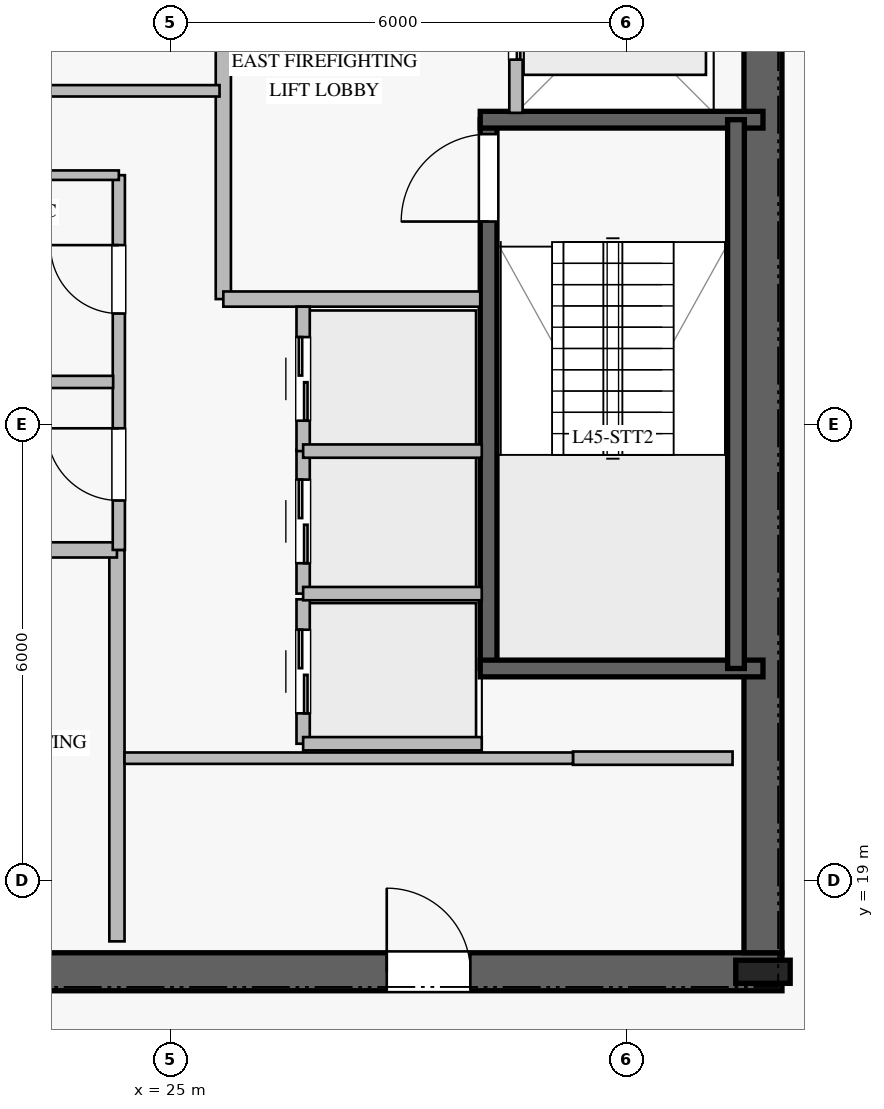
"""IFC4 building model, lengths in metres.
Left out: names, types, materials, properties, quantities, classifications, styles, units other than length and angle.
Written with IfcOpenShell. Run it as: python <this file> out.ifc"""

import sys

from ifc_helpers import new_model, si_unit, direction, frame, frame_2d, origin, origin_2d, place, context, subcontext, project, spatial, rectangle, i_section, extrude, element, fill, save


model = new_model("IFC4")
c1 = context("Model", 3, precision=1e-05, world=origin(), true_north=direction((0.0, 1.0)))
c2 = subcontext(c1, "Body", "Model", "MODEL_VIEW")
j1 = project(units=[si_unit("LENGTHUNIT", "METRE"), si_unit("PLANEANGLEUNIT", "RADIAN")], contexts=[c1])
p1 = place(None, origin())
s1 = spatial("IfcSite", under=j1, at=p1, CompositionType="ELEMENT")
p2 = place(p1, origin())
s2 = spatial("IfcBuilding", under=s1, at=p2, CompositionType="ELEMENT")
p3 = place(p2, frame((0.0, 0.0, 188.8)))
s3 = spatial("IfcBuildingStorey", under=s2, at=p3, CompositionType="ELEMENT", Elevation=188.8)
p4 = place(p3, frame((16.95, 17.8, 0.0), z_axis=(0.0, 0.0, 1.0), x_axis=(1.0, 0.0, 0.0)))
e1 = element("IfcWall", 1, at=p4, inside=s3, PredefinedType="SHEAR", context=c2, shape_type="SweptSolid", body=[
    extrude(rectangle(XDim=16.1, YDim=0.5, at=frame_2d((8.05, 0.0))), origin(), (0.0, 0.0, 1.0), 3.78),
])
p5 = place(p4, frame((5.0, 0.0, 0.0)))
e2 = element("IfcOpeningElement", 2, at=p5, cuts=e1, PredefinedType="OPENING", context=c2, shape_type="SweptSolid", body=[
    extrude(rectangle(XDim=1.2, YDim=2.25, at=frame_2d((0.6, 1.125))), frame((0.0, 0.26, 0.0), z_axis=(0.0, -1.0, 0.0), x_axis=(1.0, 0.0, 0.0)), (0.0, 0.0, 1.0), 0.52),
])
p6 = place(p4, frame((10.9, 0.0, 0.0)))
e3 = element("IfcOpeningElement", 3, at=p6, cuts=e1, PredefinedType="OPENING", context=c2, shape_type="SweptSolid", body=[
    extrude(rectangle(XDim=1.1, YDim=2.2, at=frame_2d((0.55, 1.1))), frame((0.0, 0.26, 0.0), z_axis=(0.0, -1.0, 0.0), x_axis=(1.0, 0.0, 0.0)), (0.0, 0.0, 1.0), 0.52),
])
p7 = place(p3, frame((32.8, 18.05, 0.0), z_axis=(0.0, 0.0, 1.0), x_axis=(0.0, 1.0, 0.0)))
e4 = element("IfcWall", 4, at=p7, inside=s3, PredefinedType="SHEAR", context=c2, shape_type="SweptSolid", body=[
    extrude(rectangle(XDim=13.9, YDim=0.5, at=frame_2d((6.95, 0.0))), origin(), (0.0, 0.0, 1.0), 3.78),
])
p8 = place(p3, frame((32.8, 17.8, 0.0), z_axis=(0.0, 0.0, 1.0), x_axis=(1.0, 0.0, 0.0)))
e5 = element("IfcColumn", 5, at=p8, inside=s3, PredefinedType="COLUMN", context=c2, shape_type="SweptSolid", body=[
    extrude(i_section(OverallWidth=0.304, OverallDepth=0.716, WebThickness=0.021, FlangeThickness=0.04, at=origin_2d()), origin(), (0.0, 0.0, 1.0), 4.0),
])
p9 = place(p3, frame((29.19, 21.79, 0.0), z_axis=(0.0, 0.0, 1.0), x_axis=(0.0, 1.0, 0.0)))
e6 = element("IfcWall", 6, at=p9, inside=s3, PredefinedType="SOLIDWALL", context=c2, shape_type="SweptSolid", body=[
    extrude(rectangle(XDim=7.22, YDim=0.22, at=frame_2d((3.61, 0.0))), origin(), (0.0, 0.0, 1.0), 3.78),
])
p10 = place(p9, frame((5.88, 0.0, 0.0)))
e7 = element("IfcOpeningElement", 7, at=p10, cuts=e6, PredefinedType="OPENING", context=c2, shape_type="SweptSolid", body=[
    extrude(rectangle(XDim=1.15, YDim=2.2, at=frame_2d((0.575, 1.1))), frame((0.0, 0.12, 0.0), z_axis=(0.0, -1.0, 0.0), x_axis=(1.0, 0.0, 0.0)), (0.0, 0.0, 1.0), 0.24),
])
for number, where, z_axis, x_axis in (
    (8, (29.08, 21.79, 0.0), (0.0, 0.0, 1.0), (1.0, 0.0, 0.0)),
    (9, (29.08, 29.01, 0.0), (0.0, 0.0, 1.0), (1.0, 0.0, 0.0)),
):
    element("IfcWall", number, at=place(p3, frame(where, z_axis=z_axis, x_axis=x_axis)), inside=s3, PredefinedType="SOLIDWALL", context=c2, shape_type="SweptSolid", body=[
        extrude(rectangle(XDim=3.72, YDim=0.22, at=frame_2d((1.86, 0.0))), origin(), (0.0, 0.0, 1.0), 3.78),
    ])
p11 = place(p3, frame((32.445, 29.01, 0.0), z_axis=(0.0, 0.0, 1.0), x_axis=(0.0, -1.0, 0.0)))
e10 = element("IfcWall", 10, at=p11, inside=s3, PredefinedType="SOLIDWALL", context=c2, shape_type="SweptSolid", body=[
    extrude(rectangle(XDim=7.22, YDim=0.22, at=frame_2d((3.61, 0.0))), origin(), (0.0, 0.0, 1.0), 3.78),
])
p12 = place(p3, frame((24.3, 18.2, 0.0), z_axis=(0.0, 0.0, 1.0), x_axis=(0.0, 1.0, 0.0)))
e11 = element("IfcWall", 11, at=p12, inside=s3, PredefinedType="PARTITIONING", context=c2, shape_type="SweptSolid", body=[
    extrude(rectangle(XDim=5.15, YDim=0.2, at=frame_2d((2.575, 0.0))), origin(), (0.0, 0.0, 1.0), 3.78),
])
p13 = place(p3, frame((20.92, 23.35, 0.0), z_axis=(0.0, 0.0, 1.0), x_axis=(1.0, 0.0, 0.0)))
e12 = element("IfcWall", 12, at=p13, inside=s3, PredefinedType="PARTITIONING", context=c2, shape_type="SweptSolid", body=[
    extrude(rectangle(XDim=3.38, YDim=0.2, at=frame_2d((1.69, 0.0))), origin(), (0.0, 0.0, 1.0), 3.78),
])
p14 = place(p3, frame((25.7, 26.65, 0.0), z_axis=(0.0, 0.0, 1.0), x_axis=(0.0, 1.0, 0.0)))
e13 = element("IfcWall", 13, at=p14, inside=s3, PredefinedType="PARTITIONING", context=c2, shape_type="SweptSolid", body=[
    extrude(rectangle(XDim=5.15, YDim=0.2, at=frame_2d((2.575, 0.0))), origin(), (0.0, 0.0, 1.0), 3.78),
])
p15 = place(p3, frame((25.7, 26.65, 0.0), z_axis=(0.0, 0.0, 1.0), x_axis=(1.0, 0.0, 0.0)))
e14 = element("IfcWall", 14, at=p15, inside=s3, PredefinedType="PARTITIONING", context=c2, shape_type="SweptSolid", body=[
    extrude(rectangle(XDim=3.38, YDim=0.2, at=frame_2d((1.69, 0.0))), origin(), (0.0, 0.0, 1.0), 3.78),
])
p16 = place(p3, frame((24.325, 23.35, 0.0), z_axis=(0.0, 0.0, 1.0), x_axis=(0.0, 1.0, 0.0)))
e15 = element("IfcWall", 15, at=p16, inside=s3, PredefinedType="PLUMBINGWALL", context=c2, shape_type="SweptSolid", body=[
    extrude(rectangle(XDim=4.93, YDim=0.16, at=frame_2d((2.465, 0.0))), origin(), (0.0, 0.0, 1.0), 3.78),
])
p17 = place(p16, frame((0.65, 0.0, 0.0)))
e16 = element("IfcOpeningElement", 16, at=p17, cuts=e15, PredefinedType="OPENING", context=c2, shape_type="SweptSolid", body=[
    extrude(rectangle(XDim=0.95, YDim=2.1, at=frame_2d((0.475, 1.05))), frame((0.0, 0.09, 0.0), z_axis=(0.0, -1.0, 0.0), x_axis=(1.0, 0.0, 0.0)), (0.0, 0.0, 1.0), 0.18),
])
p18 = place(p16, frame((3.11, 0.0, 0.0)))
e17 = element("IfcOpeningElement", 17, at=p18, cuts=e15, PredefinedType="OPENING", context=c2, shape_type="SweptSolid", body=[
    extrude(rectangle(XDim=0.9, YDim=2.1, at=frame_2d((0.45, 1.05))), frame((0.0, 0.09, 0.0), z_axis=(0.0, -1.0, 0.0), x_axis=(1.0, 0.0, 0.0)), (0.0, 0.0, 1.0), 0.18),
])
p19 = place(p3, frame((20.92, 28.28, 0.0), z_axis=(0.0, 0.0, 1.0), x_axis=(1.0, 0.0, 0.0)))
e18 = element("IfcWall", 18, at=p19, inside=s3, PredefinedType="PARTITIONING", context=c2, shape_type="SweptSolid", body=[
    extrude(rectangle(XDim=3.405, YDim=0.125, at=frame_2d((1.703, 0.0))), origin(), (0.0, 0.0, 1.0), 3.78),
])
p20 = place(p19, frame((0.255, 0.0, 0.0)))
e19 = element("IfcOpeningElement", 19, at=p20, cuts=e18, PredefinedType="OPENING", context=c2, shape_type="SweptSolid", body=[
    extrude(rectangle(XDim=1.0, YDim=2.15, at=frame_2d((0.5, 1.075))), frame((0.0, 0.073, 0.0), z_axis=(0.0, -1.0, 0.0), x_axis=(1.0, 0.0, 0.0)), (0.0, 0.0, 1.0), 0.145),
])
p21 = place(p3, frame((20.95, 25.56, 0.0), z_axis=(0.0, 0.0, 1.0), x_axis=(1.0, 0.0, 0.0)))
e20 = element("IfcWall", 20, at=p21, inside=s3, PredefinedType="PLUMBINGWALL", context=c2, shape_type="SweptSolid", body=[
    extrude(rectangle(XDim=3.3, YDim=0.16, at=frame_2d((1.65, 0.0))), origin(), (0.0, 0.0, 1.0), 3.78),
])
p22 = place(p3, frame((30.3, 20.61, 0.0), z_axis=(0.0, 0.0, 1.0), x_axis=(1.0, 0.0, 0.0)))
e21 = element("IfcWall", 21, at=p22, inside=s3, PredefinedType="PARTITIONING", context=c2, shape_type="SweptSolid", body=[
    extrude(rectangle(XDim=2.1, YDim=0.175, at=frame_2d((1.05, 0.0))), origin(), (0.0, 0.0, 1.0), 3.78),
])
p23 = place(p3, frame((24.4, 20.61, 0.0), z_axis=(0.0, 0.0, 1.0), x_axis=(1.0, 0.0, 0.0)))
e22 = element("IfcWall", 22, at=p23, inside=s3, PredefinedType="PARTITIONING", context=c2, shape_type="SweptSolid", body=[
    extrude(rectangle(XDim=5.9, YDim=0.15, at=frame_2d((2.95, 0.0))), origin(), (0.0, 0.0, 1.0), 3.78),
])
p24 = place(p3, frame((19.75, 29.39, 0.0), z_axis=(0.0, 0.0, 1.0), x_axis=(1.0, 0.0, 0.0)))
e23 = element("IfcWall", 23, at=p24, inside=s3, PredefinedType="PARTITIONING", context=c2, shape_type="SweptSolid", body=[
    extrude(rectangle(XDim=5.9, YDim=0.15, at=frame_2d((2.95, 0.0))), origin(), (0.0, 0.0, 1.0), 3.78),
])
p25 = place(p3, frame((26.75, 20.8, 0.0), z_axis=(0.0, 0.0, 1.0), x_axis=(0.0, 1.0, 0.0)))
e24 = element("IfcWall", 24, at=p25, inside=s3, PredefinedType="PARTITIONING", context=c2, shape_type="SweptSolid", body=[
    extrude(rectangle(XDim=1.9, YDim=0.175, at=frame_2d((0.95, 0.0))), origin(), (0.0, 0.0, 1.0), 3.78),
])
p26 = place(p25, frame((0.4, 0.0, 0.0)))
e25 = element("IfcOpeningElement", 25, at=p26, cuts=e24, PredefinedType="OPENING", context=c2, shape_type="SweptSolid", body=[
    extrude(rectangle(XDim=1.1, YDim=2.2, at=frame_2d((0.55, 1.1))), frame((0.0, 0.098, 0.0), z_axis=(0.0, -1.0, 0.0), x_axis=(1.0, 0.0, 0.0)), (0.0, 0.0, 1.0), 0.195),
])
p27 = place(p3, frame((26.75, 20.8, 0.0), z_axis=(0.0, 0.0, 1.0), x_axis=(1.0, 0.0, 0.0)))
e26 = element("IfcWall", 26, at=p27, inside=s3, PredefinedType="PARTITIONING", context=c2, shape_type="SweptSolid", body=[
    extrude(rectangle(XDim=2.35, YDim=0.175, at=frame_2d((1.175, 0.0))), origin(), (0.0, 0.0, 1.0), 3.78),
])
p28 = place(p3, frame((26.75, 22.775, 0.0), z_axis=(0.0, 0.0, 1.0), x_axis=(0.0, 1.0, 0.0)))
e27 = element("IfcWall", 27, at=p28, inside=s3, PredefinedType="PARTITIONING", context=c2, shape_type="SweptSolid", body=[
    extrude(rectangle(XDim=1.9, YDim=0.175, at=frame_2d((0.95, 0.0))), origin(), (0.0, 0.0, 1.0), 3.78),
])
p29 = place(p28, frame((0.4, 0.0, 0.0)))
e28 = element("IfcOpeningElement", 28, at=p29, cuts=e27, PredefinedType="OPENING", context=c2, shape_type="SweptSolid", body=[
    extrude(rectangle(XDim=1.1, YDim=2.2, at=frame_2d((0.55, 1.1))), frame((0.0, 0.098, 0.0), z_axis=(0.0, -1.0, 0.0), x_axis=(1.0, 0.0, 0.0)), (0.0, 0.0, 1.0), 0.195),
])
p30 = place(p3, frame((26.75, 22.775, 0.0), z_axis=(0.0, 0.0, 1.0), x_axis=(1.0, 0.0, 0.0)))
e29 = element("IfcWall", 29, at=p30, inside=s3, PredefinedType="PARTITIONING", context=c2, shape_type="SweptSolid", body=[
    extrude(rectangle(XDim=2.35, YDim=0.175, at=frame_2d((1.175, 0.0))), origin(), (0.0, 0.0, 1.0), 3.78),
])
p31 = place(p3, frame((26.75, 24.65, 0.0), z_axis=(0.0, 0.0, 1.0), x_axis=(0.0, 1.0, 0.0)))
e30 = element("IfcWall", 30, at=p31, inside=s3, PredefinedType="PARTITIONING", context=c2, shape_type="SweptSolid", body=[
    extrude(rectangle(XDim=1.9, YDim=0.175, at=frame_2d((0.95, 0.0))), origin(), (0.0, 0.0, 1.0), 3.78),
])
p32 = place(p31, frame((0.4, 0.0, 0.0)))
e31 = element("IfcOpeningElement", 31, at=p32, cuts=e30, PredefinedType="OPENING", context=c2, shape_type="SweptSolid", body=[
    extrude(rectangle(XDim=1.1, YDim=2.2, at=frame_2d((0.55, 1.1))), frame((0.0, 0.098, 0.0), z_axis=(0.0, -1.0, 0.0), x_axis=(1.0, 0.0, 0.0)), (0.0, 0.0, 1.0), 0.195),
])
p33 = place(p3, frame((26.75, 24.65, 0.0), z_axis=(0.0, 0.0, 1.0), x_axis=(1.0, 0.0, 0.0)))
e32 = element("IfcWall", 32, at=p33, inside=s3, PredefinedType="PARTITIONING", context=c2, shape_type="SweptSolid", body=[
    extrude(rectangle(XDim=2.35, YDim=0.175, at=frame_2d((1.175, 0.0))), origin(), (0.0, 0.0, 1.0), 3.78),
])
p34 = place(p3, frame((29.55, 29.1, 0.0), z_axis=(0.0, 0.0, 1.0), x_axis=(0.0, 1.0, 0.0)))
e33 = element("IfcWall", 33, at=p34, inside=s3, PredefinedType="PARTITIONING", context=c2, shape_type="SweptSolid", body=[
    extrude(rectangle(XDim=2.6, YDim=0.175, at=frame_2d((1.3, 0.0))), origin(), (0.0, 0.0, 1.0), 3.78),
])
p35 = place(p34, frame((0.7, 0.0, 0.0)))
e34 = element("IfcOpeningElement", 34, at=p35, cuts=e33, PredefinedType="OPENING", context=c2, shape_type="SweptSolid", body=[
    extrude(rectangle(XDim=1.2, YDim=2.2, at=frame_2d((0.6, 1.1))), frame((0.0, 0.098, 0.0), z_axis=(0.0, -1.0, 0.0), x_axis=(1.0, 0.0, 0.0)), (0.0, 0.0, 1.0), 0.195),
])
p36 = place(p10, origin())
e35 = element("IfcDoor", 35, at=p36, inside=s3, OperationType="SINGLE_SWING_LEFT", PredefinedType="DOOR", context=c2, shape_type="SweptSolid", body=[
    extrude(rectangle(XDim=1.15, YDim=2.2, at=frame_2d((0.575, 1.1))), frame((0.0, 0.025, 0.0), z_axis=(0.0, -1.0, 0.0), x_axis=(1.0, 0.0, 0.0)), (0.0, 0.0, 1.0), 0.05),
])
fill(e7, e35)
p37 = place(p17, origin())
e36 = element("IfcDoor", 36, at=p37, inside=s3, OperationType="SINGLE_SWING_RIGHT", PredefinedType="DOOR", context=c2, shape_type="SweptSolid", body=[
    extrude(rectangle(XDim=0.95, YDim=2.1, at=frame_2d((0.475, 1.05))), frame((0.0, 0.025, 0.0), z_axis=(0.0, -1.0, 0.0), x_axis=(1.0, 0.0, 0.0)), (0.0, 0.0, 1.0), 0.05),
])
fill(e16, e36)
p38 = place(p18, origin())
e37 = element("IfcDoor", 37, at=p38, inside=s3, OperationType="SINGLE_SWING_RIGHT", PredefinedType="DOOR", context=c2, shape_type="SweptSolid", body=[
    extrude(rectangle(XDim=0.9, YDim=2.1, at=frame_2d((0.45, 1.05))), frame((0.0, 0.025, 0.0), z_axis=(0.0, -1.0, 0.0), x_axis=(1.0, 0.0, 0.0)), (0.0, 0.0, 1.0), 0.05),
])
fill(e17, e37)
p39 = place(p6, origin())
e38 = element("IfcDoor", 38, at=p39, inside=s3, OperationType="SINGLE_SWING_LEFT", PredefinedType="DOOR", context=c2, shape_type="SweptSolid", body=[
    extrude(rectangle(XDim=1.1, YDim=2.2, at=frame_2d((0.55, 1.1))), frame((0.0, 0.025, 0.0), z_axis=(0.0, -1.0, 0.0), x_axis=(1.0, 0.0, 0.0)), (0.0, 0.0, 1.0), 0.05),
])
fill(e3, e38)
p40 = place(p26, origin())
e39 = element("IfcDoor", 39, at=p40, inside=s3, OperationType="DOUBLE_DOOR_SLIDING", PredefinedType="DOOR", context=c2, shape_type="SweptSolid", body=[
    extrude(rectangle(XDim=1.1, YDim=2.2, at=frame_2d((0.55, 1.1))), frame((0.0, 0.025, 0.0), z_axis=(0.0, -1.0, 0.0), x_axis=(1.0, 0.0, 0.0)), (0.0, 0.0, 1.0), 0.05),
])
fill(e25, e39)
p41 = place(p29, origin())
e40 = element("IfcDoor", 40, at=p41, inside=s3, OperationType="DOUBLE_DOOR_SLIDING", PredefinedType="DOOR", context=c2, shape_type="SweptSolid", body=[
    extrude(rectangle(XDim=1.1, YDim=2.2, at=frame_2d((0.55, 1.1))), frame((0.0, 0.025, 0.0), z_axis=(0.0, -1.0, 0.0), x_axis=(1.0, 0.0, 0.0)), (0.0, 0.0, 1.0), 0.05),
])
fill(e28, e40)
p42 = place(p32, origin())
e41 = element("IfcDoor", 41, at=p42, inside=s3, OperationType="DOUBLE_DOOR_SLIDING", PredefinedType="DOOR", context=c2, shape_type="SweptSolid", body=[
    extrude(rectangle(XDim=1.1, YDim=2.2, at=frame_2d((0.55, 1.1))), frame((0.0, 0.025, 0.0), z_axis=(0.0, -1.0, 0.0), x_axis=(1.0, 0.0, 0.0)), (0.0, 0.0, 1.0), 0.05),
])
fill(e31, e41)
p43 = place(p35, origin())
e42 = element("IfcDoor", 42, at=p43, inside=s3, OperationType="DOUBLE_DOOR_SLIDING", PredefinedType="DOOR", context=c2, shape_type="SweptSolid", body=[
    extrude(rectangle(XDim=1.2, YDim=2.2, at=frame_2d((0.6, 1.1))), frame((0.0, 0.025, 0.0), z_axis=(0.0, -1.0, 0.0), x_axis=(1.0, 0.0, 0.0)), (0.0, 0.0, 1.0), 0.05),
])
fill(e34, e42)
save(model, sys.argv[1])
